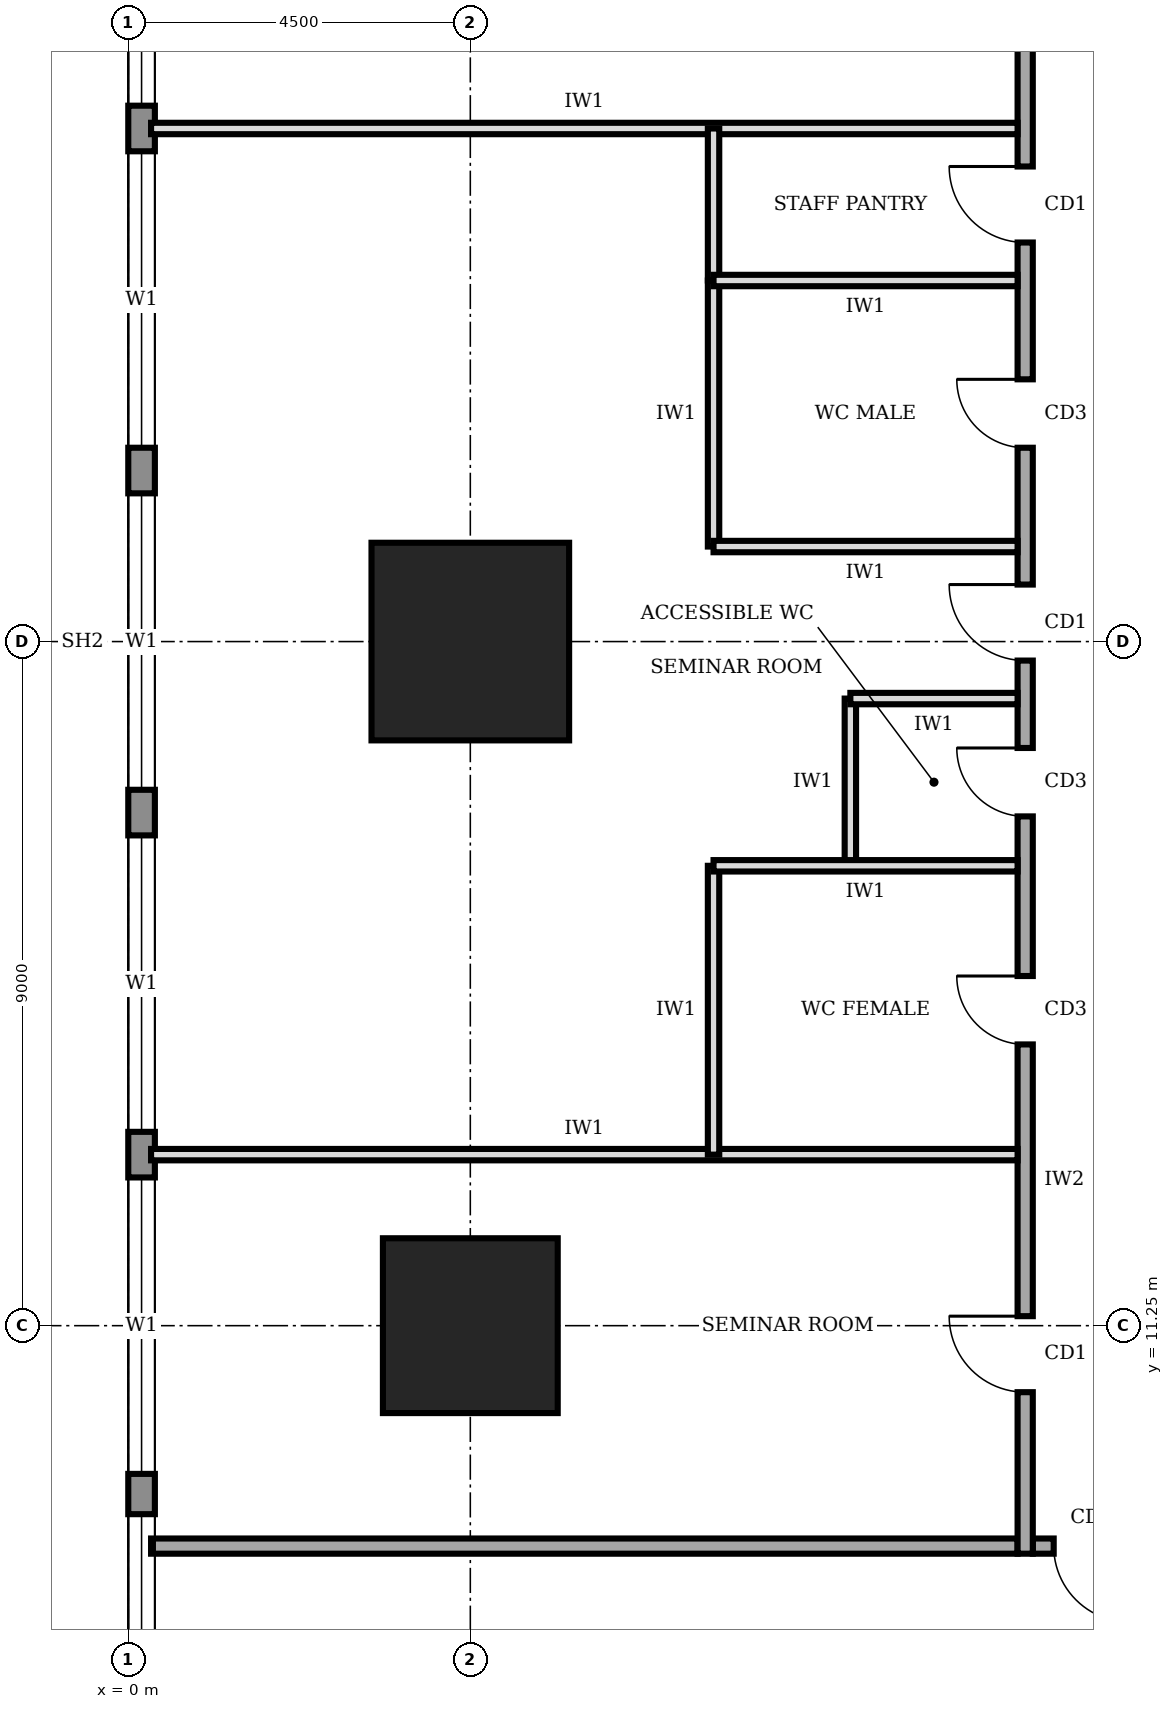
"""IFC4 building model, lengths in metres.
Left out: names, types, materials, properties, quantities, classifications, styles, units other than length and angle.
Written with IfcOpenShell. Run it as: python <this file> out.ifc"""

import sys

from ifc_helpers import new_model, si_unit, direction, frame, frame_2d, origin, origin_2d, place, context, subcontext, project, spatial, rectangle, extrude, element, fill, save


model = new_model("IFC4")
c1 = context("Model", 3, precision=1e-05, world=origin(), true_north=direction((0.0, 1.0)))
c2 = subcontext(c1, "Body", "Model", "MODEL_VIEW")
j1 = project(units=[si_unit("LENGTHUNIT", "METRE"), si_unit("PLANEANGLEUNIT", "RADIAN")], contexts=[c1])
p1 = place(None, origin())
s1 = spatial("IfcSite", under=j1, at=p1, CompositionType="ELEMENT")
p2 = place(p1, origin())
s2 = spatial("IfcBuilding", under=s1, at=p2, CompositionType="ELEMENT")
p3 = place(p2, frame((0.0, 0.0, 105.0)))
s3 = spatial("IfcBuildingStorey", under=s2, at=p3, CompositionType="ELEMENT", Elevation=105.0)
p4 = place(p3, frame((4.5, 11.25, 0.0), z_axis=(0.0, 0.0, 1.0), x_axis=(1.0, 0.0, 0.0)))
e1 = element("IfcColumn", 1, at=p4, inside=s3, PredefinedType="COLUMN", context=c2, shape_type="SweptSolid", body=[
    extrude(rectangle(XDim=2.3, YDim=2.3, at=origin_2d()), origin(), (0.0, 0.0, 1.0), 4.0),
])
p5 = place(p3, frame((4.5, 20.25, 0.0), z_axis=(0.0, 0.0, 1.0), x_axis=(1.0, 0.0, 0.0)))
e2 = element("IfcColumn", 2, at=p5, inside=s3, PredefinedType="COLUMN", context=c2, shape_type="SweptSolid", body=[
    extrude(rectangle(XDim=2.6, YDim=2.6, at=origin_2d()), origin(), (0.0, 0.0, 1.0), 4.0),
])
p6 = place(p3, frame((0.175, 35.98, 0.0), z_axis=(0.0, 0.0, 1.0), x_axis=(0.0, -1.0, 0.0)))
e3 = element("IfcWall", 3, at=p6, inside=s3, PredefinedType="STANDARD", context=c2, shape_type="SweptSolid", body=[
    extrude(rectangle(XDim=31.46, YDim=0.35, at=frame_2d((15.73, 0.0))), origin(), (0.0, 0.0, 1.0), 3.75),
])
p7 = place(p6, frame((27.21, 0.0, 0.9)))
e4 = element("IfcOpeningElement", 4, at=p7, cuts=e3, PredefinedType="OPENING", context=c2, shape_type="SweptSolid", body=[
    extrude(rectangle(XDim=3.9, YDim=2.2, at=frame_2d((1.95, 1.1))), frame((0.0, 0.185, 0.0), z_axis=(0.0, -1.0, 0.0), x_axis=(1.0, 0.0, 0.0)), (0.0, 0.0, 1.0), 0.37),
])
p8 = place(p6, frame((22.78, 0.0, 0.9)))
e5 = element("IfcOpeningElement", 5, at=p8, cuts=e3, PredefinedType="OPENING", context=c2, shape_type="SweptSolid", body=[
    extrude(rectangle(XDim=3.9, YDim=2.2, at=frame_2d((1.95, 1.1))), frame((0.0, 0.185, 0.0), z_axis=(0.0, -1.0, 0.0), x_axis=(1.0, 0.0, 0.0)), (0.0, 0.0, 1.0), 0.37),
])
p9 = place(p6, frame((18.28, 0.0, 0.9)))
e6 = element("IfcOpeningElement", 6, at=p9, cuts=e3, PredefinedType="OPENING", context=c2, shape_type="SweptSolid", body=[
    extrude(rectangle(XDim=3.9, YDim=2.2, at=frame_2d((1.95, 1.1))), frame((0.0, 0.185, 0.0), z_axis=(0.0, -1.0, 0.0), x_axis=(1.0, 0.0, 0.0)), (0.0, 0.0, 1.0), 0.37),
])
p10 = place(p6, frame((13.78, 0.0, 0.9)))
e7 = element("IfcOpeningElement", 7, at=p10, cuts=e3, PredefinedType="OPENING", context=c2, shape_type="SweptSolid", body=[
    extrude(rectangle(XDim=3.9, YDim=2.2, at=frame_2d((1.95, 1.1))), frame((0.0, 0.185, 0.0), z_axis=(0.0, -1.0, 0.0), x_axis=(1.0, 0.0, 0.0)), (0.0, 0.0, 1.0), 0.37),
])
p11 = place(p6, frame((9.28, 0.0, 0.9)))
e8 = element("IfcOpeningElement", 8, at=p11, cuts=e3, PredefinedType="OPENING", context=c2, shape_type="SweptSolid", body=[
    extrude(rectangle(XDim=3.9, YDim=2.2, at=frame_2d((1.95, 1.1))), frame((0.0, 0.185, 0.0), z_axis=(0.0, -1.0, 0.0), x_axis=(1.0, 0.0, 0.0)), (0.0, 0.0, 1.0), 0.37),
])
p12 = place(p6, frame((4.78, 0.0, 0.9)))
e9 = element("IfcOpeningElement", 9, at=p12, cuts=e3, PredefinedType="OPENING", context=c2, shape_type="SweptSolid", body=[
    extrude(rectangle(XDim=3.9, YDim=2.2, at=frame_2d((1.95, 1.1))), frame((0.0, 0.185, 0.0), z_axis=(0.0, -1.0, 0.0), x_axis=(1.0, 0.0, 0.0)), (0.0, 0.0, 1.0), 0.37),
])
p13 = place(p3, frame((11.9, 8.35, 0.0), z_axis=(0.0, 0.0, 1.0), x_axis=(1.0, 0.0, 0.0)))
e10 = element("IfcWall", 10, at=p13, inside=s3, PredefinedType="SOLIDWALL", context=c2, shape_type="SweptSolid", body=[
    extrude(rectangle(XDim=16.9, YDim=0.2, at=frame_2d((8.45, 0.0))), origin(), (0.0, 0.0, 1.0), 3.75),
])
p14 = place(p13, frame((0.275, 0.0, 0.0)))
e11 = element("IfcOpeningElement", 11, at=p14, cuts=e10, PredefinedType="OPENING", context=c2, shape_type="SweptSolid", body=[
    extrude(rectangle(XDim=1.0, YDim=2.1, at=frame_2d((0.5, 1.05))), frame((0.0, 0.11, 0.0), z_axis=(0.0, -1.0, 0.0), x_axis=(1.0, 0.0, 0.0)), (0.0, 0.0, 1.0), 0.22),
])
p15 = place(p13, frame((5.6, 0.0, 0.0)))
e12 = element("IfcOpeningElement", 12, at=p15, cuts=e10, PredefinedType="OPENING", context=c2, shape_type="SweptSolid", body=[
    extrude(rectangle(XDim=1.0, YDim=2.1, at=frame_2d((0.5, 1.05))), frame((0.0, 0.11, 0.0), z_axis=(0.0, -1.0, 0.0), x_axis=(1.0, 0.0, 0.0)), (0.0, 0.0, 1.0), 0.22),
])
p16 = place(p13, frame((12.85, 0.0, 0.0)))
e13 = element("IfcOpeningElement", 13, at=p16, cuts=e10, PredefinedType="OPENING", context=c2, shape_type="SweptSolid", body=[
    extrude(rectangle(XDim=1.8, YDim=2.1, at=frame_2d((0.9, 1.05))), frame((0.0, 0.11, 0.0), z_axis=(0.0, -1.0, 0.0), x_axis=(1.0, 0.0, 0.0)), (0.0, 0.0, 1.0), 0.22),
])
p17 = place(p3, frame((11.8, 32.05, 0.0), z_axis=(0.0, 0.0, 1.0), x_axis=(0.0, -1.0, 0.0)))
e14 = element("IfcWall", 14, at=p17, inside=s3, PredefinedType="SOLIDWALL", context=c2, shape_type="SweptSolid", body=[
    extrude(rectangle(XDim=23.8, YDim=0.2, at=frame_2d((11.9, 0.0))), origin(), (0.0, 0.0, 1.0), 3.75),
])
p18 = place(p17, frame((20.675, 0.0, 0.0)))
e15 = element("IfcOpeningElement", 15, at=p18, cuts=e14, PredefinedType="OPENING", context=c2, shape_type="SweptSolid", body=[
    extrude(rectangle(XDim=1.0, YDim=2.1, at=frame_2d((0.5, 1.05))), frame((0.0, 0.11, 0.0), z_axis=(0.0, -1.0, 0.0), x_axis=(1.0, 0.0, 0.0)), (0.0, 0.0, 1.0), 0.22),
])
p19 = place(p17, frame((16.2, 0.0, 0.0)))
e16 = element("IfcOpeningElement", 16, at=p19, cuts=e14, PredefinedType="OPENING", context=c2, shape_type="SweptSolid", body=[
    extrude(rectangle(XDim=0.9, YDim=2.1, at=frame_2d((0.45, 1.05))), frame((0.0, 0.11, 0.0), z_axis=(0.0, -1.0, 0.0), x_axis=(1.0, 0.0, 0.0)), (0.0, 0.0, 1.0), 0.22),
])
p20 = place(p17, frame((13.2, 0.0, 0.0)))
e17 = element("IfcOpeningElement", 17, at=p20, cuts=e14, PredefinedType="OPENING", context=c2, shape_type="SweptSolid", body=[
    extrude(rectangle(XDim=0.9, YDim=2.1, at=frame_2d((0.45, 1.05))), frame((0.0, 0.11, 0.0), z_axis=(0.0, -1.0, 0.0), x_axis=(1.0, 0.0, 0.0)), (0.0, 0.0, 1.0), 0.22),
])
p21 = place(p17, frame((8.35, 0.0, 0.0)))
e18 = element("IfcOpeningElement", 18, at=p21, cuts=e14, PredefinedType="OPENING", context=c2, shape_type="SweptSolid", body=[
    extrude(rectangle(XDim=0.9, YDim=2.1, at=frame_2d((0.45, 1.05))), frame((0.0, 0.11, 0.0), z_axis=(0.0, -1.0, 0.0), x_axis=(1.0, 0.0, 0.0)), (0.0, 0.0, 1.0), 0.22),
])
p22 = place(p17, frame((5.55, 0.0, 0.0)))
e19 = element("IfcOpeningElement", 19, at=p22, cuts=e14, PredefinedType="OPENING", context=c2, shape_type="SweptSolid", body=[
    extrude(rectangle(XDim=1.0, YDim=2.1, at=frame_2d((0.5, 1.05))), frame((0.0, 0.11, 0.0), z_axis=(0.0, -1.0, 0.0), x_axis=(1.0, 0.0, 0.0)), (0.0, 0.0, 1.0), 0.22),
])
p23 = place(p17, frame((11.05, 0.0, 0.0)))
e20 = element("IfcOpeningElement", 20, at=p23, cuts=e14, PredefinedType="OPENING", context=c2, shape_type="SweptSolid", body=[
    extrude(rectangle(XDim=1.0, YDim=2.1, at=frame_2d((0.5, 1.05))), frame((0.0, 0.11, 0.0), z_axis=(0.0, -1.0, 0.0), x_axis=(1.0, 0.0, 0.0)), (0.0, 0.0, 1.0), 0.22),
])
p24 = place(p17, frame((1.925, 0.0, 0.0)))
e21 = element("IfcOpeningElement", 21, at=p24, cuts=e14, PredefinedType="OPENING", context=c2, shape_type="SweptSolid", body=[
    extrude(rectangle(XDim=1.0, YDim=2.1, at=frame_2d((0.5, 1.05))), frame((0.0, 0.11, 0.0), z_axis=(0.0, -1.0, 0.0), x_axis=(1.0, 0.0, 0.0)), (0.0, 0.0, 1.0), 0.22),
])
p25 = place(p3, frame((0.3, 8.35, 0.0), z_axis=(0.0, 0.0, 1.0), x_axis=(1.0, 0.0, 0.0)))
e22 = element("IfcWall", 22, at=p25, inside=s3, PredefinedType="SOLIDWALL", context=c2, shape_type="SweptSolid", body=[
    extrude(rectangle(XDim=11.4, YDim=0.2, at=frame_2d((5.7, 0.0))), origin(), (0.0, 0.0, 1.0), 3.75),
])
for number, where, z_axis, x_axis in (
    (23, (0.3, 13.5, 0.0), (0.0, 0.0, 1.0), (1.0, 0.0, 0.0)),
    (24, (0.3, 27.0, 0.0), (0.0, 0.0, 1.0), (1.0, 0.0, 0.0)),
):
    element("IfcWall", number, at=place(p3, frame(where, z_axis=z_axis, x_axis=x_axis)), inside=s3, PredefinedType="PARTITIONING", context=c2, shape_type="SweptSolid", body=[
        extrude(rectangle(XDim=11.4, YDim=0.15, at=frame_2d((5.7, 0.0))), origin(), (0.0, 0.0, 1.0), 3.75),
    ])
p26 = place(p3, frame((11.7, 17.3, 0.0), z_axis=(0.0, 0.0, 1.0), x_axis=(-1.0, 0.0, 0.0)))
e25 = element("IfcWall", 25, at=p26, inside=s3, PredefinedType="PARTITIONING", context=c2, shape_type="SweptSolid", body=[
    extrude(rectangle(XDim=4.0, YDim=0.15, at=frame_2d((2.0, 0.0))), origin(), (0.0, 0.0, 1.0), 3.75),
])
p27 = place(p3, frame((11.7, 19.5, 0.0), z_axis=(0.0, 0.0, 1.0), x_axis=(-1.0, 0.0, 0.0)))
e26 = element("IfcWall", 26, at=p27, inside=s3, PredefinedType="PARTITIONING", context=c2, shape_type="SweptSolid", body=[
    extrude(rectangle(XDim=2.2, YDim=0.15, at=frame_2d((1.1, 0.0))), origin(), (0.0, 0.0, 1.0), 2.85),
])
for number, where, z_axis, x_axis in (
    (27, (11.7, 21.5, 0.0), (0.0, 0.0, 1.0), (-1.0, 0.0, 0.0)),
    (28, (11.7, 25.0, 0.0), (0.0, 0.0, 1.0), (-1.0, 0.0, 0.0)),
):
    element("IfcWall", number, at=place(p3, frame(where, z_axis=z_axis, x_axis=x_axis)), inside=s3, PredefinedType="PARTITIONING", context=c2, shape_type="SweptSolid", body=[
        extrude(rectangle(XDim=4.0, YDim=0.15, at=frame_2d((2.0, 0.0))), origin(), (0.0, 0.0, 1.0), 3.75),
    ])
p28 = place(p3, frame((7.7, 13.5, 0.0), z_axis=(0.0, 0.0, 1.0), x_axis=(0.0, 1.0, 0.0)))
e29 = element("IfcWall", 29, at=p28, inside=s3, PredefinedType="PARTITIONING", context=c2, shape_type="SweptSolid", body=[
    extrude(rectangle(XDim=3.8, YDim=0.15, at=frame_2d((1.9, 0.0))), origin(), (0.0, 0.0, 1.0), 3.75),
])
p29 = place(p3, frame((9.5, 17.3, 0.0), z_axis=(0.0, 0.0, 1.0), x_axis=(0.0, 1.0, 0.0)))
e30 = element("IfcWall", 30, at=p29, inside=s3, PredefinedType="PARTITIONING", context=c2, shape_type="SweptSolid", body=[
    extrude(rectangle(XDim=2.2, YDim=0.15, at=frame_2d((1.1, 0.0))), origin(), (0.0, 0.0, 1.0), 3.75),
])
p30 = place(p3, frame((7.7, 21.5, 0.0), z_axis=(0.0, 0.0, 1.0), x_axis=(0.0, 1.0, 0.0)))
e31 = element("IfcWall", 31, at=p30, inside=s3, PredefinedType="PARTITIONING", context=c2, shape_type="SweptSolid", body=[
    extrude(rectangle(XDim=3.5, YDim=0.15, at=frame_2d((1.75, 0.0))), origin(), (0.0, 0.0, 1.0), 3.75),
])
p31 = place(p3, frame((7.7, 25.0, 0.0), z_axis=(0.0, 0.0, 1.0), x_axis=(0.0, 1.0, 0.0)))
e32 = element("IfcWall", 32, at=p31, inside=s3, PredefinedType="PARTITIONING", context=c2, shape_type="SweptSolid", body=[
    extrude(rectangle(XDim=2.0, YDim=0.15, at=frame_2d((1.0, 0.0))), origin(), (0.0, 0.0, 1.0), 3.75),
])
p32 = place(p7, origin())
e33 = element("IfcWindow", 33, at=p32, inside=s3, PartitioningType="SINGLE_PANEL", PredefinedType="WINDOW", context=c2, shape_type="SweptSolid", body=[
    extrude(rectangle(XDim=3.9, YDim=2.2, at=frame_2d((1.95, 1.1))), frame((0.0, 0.03, 0.0), z_axis=(0.0, -1.0, 0.0), x_axis=(1.0, 0.0, 0.0)), (0.0, 0.0, 1.0), 0.06),
])
fill(e4, e33)
p33 = place(p8, origin())
e34 = element("IfcWindow", 34, at=p33, inside=s3, PartitioningType="SINGLE_PANEL", PredefinedType="WINDOW", context=c2, shape_type="SweptSolid", body=[
    extrude(rectangle(XDim=3.9, YDim=2.2, at=frame_2d((1.95, 1.1))), frame((0.0, 0.03, 0.0), z_axis=(0.0, -1.0, 0.0), x_axis=(1.0, 0.0, 0.0)), (0.0, 0.0, 1.0), 0.06),
])
fill(e5, e34)
p34 = place(p9, origin())
e35 = element("IfcWindow", 35, at=p34, inside=s3, PartitioningType="SINGLE_PANEL", PredefinedType="WINDOW", context=c2, shape_type="SweptSolid", body=[
    extrude(rectangle(XDim=3.9, YDim=2.2, at=frame_2d((1.95, 1.1))), frame((0.0, 0.03, 0.0), z_axis=(0.0, -1.0, 0.0), x_axis=(1.0, 0.0, 0.0)), (0.0, 0.0, 1.0), 0.06),
])
fill(e6, e35)
p35 = place(p10, origin())
e36 = element("IfcWindow", 36, at=p35, inside=s3, PartitioningType="SINGLE_PANEL", PredefinedType="WINDOW", context=c2, shape_type="SweptSolid", body=[
    extrude(rectangle(XDim=3.9, YDim=2.2, at=frame_2d((1.95, 1.1))), frame((0.0, 0.03, 0.0), z_axis=(0.0, -1.0, 0.0), x_axis=(1.0, 0.0, 0.0)), (0.0, 0.0, 1.0), 0.06),
])
fill(e7, e36)
p36 = place(p11, origin())
e37 = element("IfcWindow", 37, at=p36, inside=s3, PartitioningType="SINGLE_PANEL", PredefinedType="WINDOW", context=c2, shape_type="SweptSolid", body=[
    extrude(rectangle(XDim=3.9, YDim=2.2, at=frame_2d((1.95, 1.1))), frame((0.0, 0.03, 0.0), z_axis=(0.0, -1.0, 0.0), x_axis=(1.0, 0.0, 0.0)), (0.0, 0.0, 1.0), 0.06),
])
fill(e8, e37)
p37 = place(p12, origin())
e38 = element("IfcWindow", 38, at=p37, inside=s3, PartitioningType="SINGLE_PANEL", PredefinedType="WINDOW", context=c2, shape_type="SweptSolid", body=[
    extrude(rectangle(XDim=3.9, YDim=2.2, at=frame_2d((1.95, 1.1))), frame((0.0, 0.03, 0.0), z_axis=(0.0, -1.0, 0.0), x_axis=(1.0, 0.0, 0.0)), (0.0, 0.0, 1.0), 0.06),
])
fill(e9, e38)
p38 = place(p14, frame((1.0, 0.0, 0.0), z_axis=(0.0, 0.0, 1.0), x_axis=(-1.0, 0.0, 0.0)))
e39 = element("IfcDoor", 39, at=p38, inside=s3, OperationType="SINGLE_SWING_LEFT", PredefinedType="DOOR", context=c2, shape_type="SweptSolid", body=[
    extrude(rectangle(XDim=1.0, YDim=2.1, at=frame_2d((0.5, 1.05))), frame((0.0, 0.025, 0.0), z_axis=(0.0, -1.0, 0.0), x_axis=(1.0, 0.0, 0.0)), (0.0, 0.0, 1.0), 0.05),
])
fill(e11, e39)
p39 = place(p18, frame((1.0, 0.0, 0.0), z_axis=(0.0, 0.0, 1.0), x_axis=(-1.0, 0.0, 0.0)))
e40 = element("IfcDoor", 40, at=p39, inside=s3, OperationType="SINGLE_SWING_RIGHT", PredefinedType="DOOR", context=c2, shape_type="SweptSolid", body=[
    extrude(rectangle(XDim=1.0, YDim=2.1, at=frame_2d((0.5, 1.05))), frame((0.0, 0.025, 0.0), z_axis=(0.0, -1.0, 0.0), x_axis=(1.0, 0.0, 0.0)), (0.0, 0.0, 1.0), 0.05),
])
fill(e15, e40)
p40 = place(p19, frame((0.9, 0.0, 0.0), z_axis=(0.0, 0.0, 1.0), x_axis=(-1.0, 0.0, 0.0)))
e41 = element("IfcDoor", 41, at=p40, inside=s3, OperationType="SINGLE_SWING_RIGHT", PredefinedType="DOOR", context=c2, shape_type="SweptSolid", body=[
    extrude(rectangle(XDim=0.9, YDim=2.1, at=frame_2d((0.45, 1.05))), frame((0.0, 0.025, 0.0), z_axis=(0.0, -1.0, 0.0), x_axis=(1.0, 0.0, 0.0)), (0.0, 0.0, 1.0), 0.05),
])
fill(e16, e41)
p41 = place(p20, frame((0.9, 0.0, 0.0), z_axis=(0.0, 0.0, 1.0), x_axis=(-1.0, 0.0, 0.0)))
e42 = element("IfcDoor", 42, at=p41, inside=s3, OperationType="SINGLE_SWING_RIGHT", PredefinedType="DOOR", context=c2, shape_type="SweptSolid", body=[
    extrude(rectangle(XDim=0.9, YDim=2.1, at=frame_2d((0.45, 1.05))), frame((0.0, 0.025, 0.0), z_axis=(0.0, -1.0, 0.0), x_axis=(1.0, 0.0, 0.0)), (0.0, 0.0, 1.0), 0.05),
])
fill(e17, e42)
p42 = place(p21, frame((0.9, 0.0, 0.0), z_axis=(0.0, 0.0, 1.0), x_axis=(-1.0, 0.0, 0.0)))
e43 = element("IfcDoor", 43, at=p42, inside=s3, OperationType="SINGLE_SWING_RIGHT", PredefinedType="DOOR", context=c2, shape_type="SweptSolid", body=[
    extrude(rectangle(XDim=0.9, YDim=2.1, at=frame_2d((0.45, 1.05))), frame((0.0, 0.025, 0.0), z_axis=(0.0, -1.0, 0.0), x_axis=(1.0, 0.0, 0.0)), (0.0, 0.0, 1.0), 0.05),
])
fill(e18, e43)
p43 = place(p22, frame((1.0, 0.0, 0.0), z_axis=(0.0, 0.0, 1.0), x_axis=(-1.0, 0.0, 0.0)))
e44 = element("IfcDoor", 44, at=p43, inside=s3, OperationType="SINGLE_SWING_RIGHT", PredefinedType="DOOR", context=c2, shape_type="SweptSolid", body=[
    extrude(rectangle(XDim=1.0, YDim=2.1, at=frame_2d((0.5, 1.05))), frame((0.0, 0.025, 0.0), z_axis=(0.0, -1.0, 0.0), x_axis=(1.0, 0.0, 0.0)), (0.0, 0.0, 1.0), 0.05),
])
fill(e19, e44)
p44 = place(p23, frame((1.0, 0.0, 0.0), z_axis=(0.0, 0.0, 1.0), x_axis=(-1.0, 0.0, 0.0)))
e45 = element("IfcDoor", 45, at=p44, inside=s3, OperationType="SINGLE_SWING_RIGHT", PredefinedType="DOOR", context=c2, shape_type="SweptSolid", body=[
    extrude(rectangle(XDim=1.0, YDim=2.1, at=frame_2d((0.5, 1.05))), frame((0.0, 0.025, 0.0), z_axis=(0.0, -1.0, 0.0), x_axis=(1.0, 0.0, 0.0)), (0.0, 0.0, 1.0), 0.05),
])
fill(e20, e45)
save(model, sys.argv[1])
